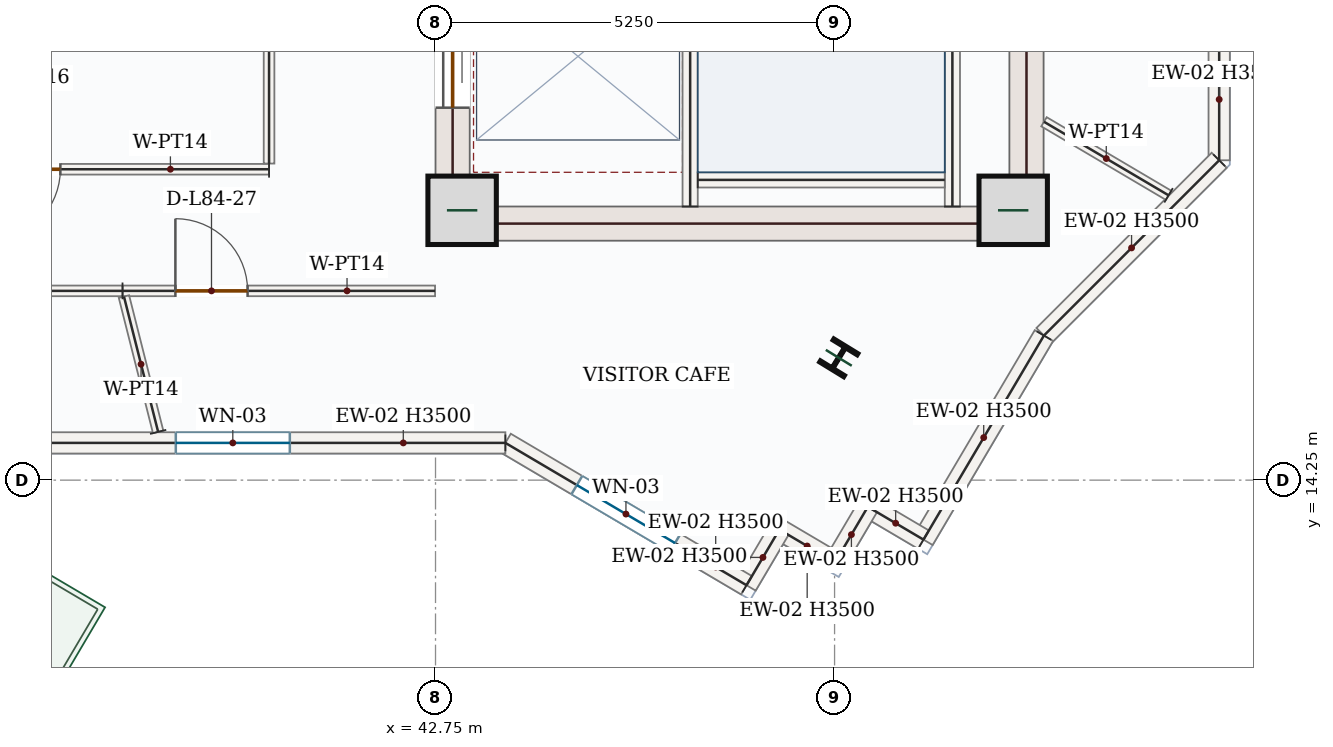
"""IFC4 building model, lengths in metres.
Left out: names, types, materials, properties, quantities, classifications, styles, units other than length and angle.
Written with IfcOpenShell. Run it as: python <this file> out.ifc"""

import sys

from ifc_helpers import new_model, si_unit, direction, frame, frame_2d, origin, origin_2d, place, context, subcontext, project, spatial, rectangle, i_section, extrude, source, transform, mapped, element, fill, save


model = new_model("IFC4")
c1 = context("Model", 3, precision=1e-05, world=origin(), true_north=direction((0.0, 1.0)))
c2 = subcontext(c1, "Body", "Model", "MODEL_VIEW")
j1 = project(units=[si_unit("LENGTHUNIT", "METRE"), si_unit("PLANEANGLEUNIT", "RADIAN")], contexts=[c1])
p1 = place(None, origin())
s1 = spatial("IfcSite", under=j1, at=p1, CompositionType="ELEMENT")
p2 = place(p1, origin())
s2 = spatial("IfcBuilding", under=s1, at=p2, CompositionType="ELEMENT")
p3 = place(p2, frame((0.0, 0.0, 346.05)))
s3 = spatial("IfcBuildingStorey", under=s2, at=p3, CompositionType="ELEMENT", Elevation=346.05)
p4 = place(p3, frame((42.975, 17.4, 0.0), z_axis=(0.0, 0.0, 1.0), x_axis=(0.0, 1.0, 0.0)))
e1 = element("IfcWall", 1, at=p4, inside=s3, PredefinedType="SHEAR", context=c2, shape_type="SweptSolid", body=[
    extrude(rectangle(XDim=8.55, YDim=0.45, at=frame_2d((4.275, 0.0))), origin(), (0.0, 0.0, 1.0), 3.5),
])
p5 = place(p4, frame((6.65, 0.0, 0.0)))
e2 = element("IfcOpeningElement", 2, at=p5, cuts=e1, PredefinedType="OPENING", context=c2, shape_type="SweptSolid", body=[
    extrude(rectangle(XDim=1.1, YDim=2.2, at=frame_2d((0.55, 1.1))), frame((0.0, 0.235, 0.0), z_axis=(0.0, -1.0, 0.0), x_axis=(1.0, 0.0, 0.0)), (0.0, 0.0, 1.0), 0.47),
])
p6 = place(p4, frame((1.75, 0.0, 0.0)))
e3 = element("IfcOpeningElement", 3, at=p6, cuts=e1, PredefinedType="OPENING", context=c2, shape_type="SweptSolid", body=[
    extrude(rectangle(XDim=1.3, YDim=2.2, at=frame_2d((0.65, 1.1))), frame((0.0, 0.235, 0.0), z_axis=(0.0, -1.0, 0.0), x_axis=(1.0, 0.0, 0.0)), (0.0, 0.0, 1.0), 0.47),
])
p7 = place(p4, frame((4.3, 0.0, 0.0)))
e4 = element("IfcOpeningElement", 4, at=p7, cuts=e1, PredefinedType="OPENING", context=c2, shape_type="SweptSolid", body=[
    extrude(rectangle(XDim=0.88, YDim=2.1, at=frame_2d((0.44, 1.05))), frame((0.0, 0.235, 0.0), z_axis=(0.0, -1.0, 0.0), x_axis=(1.0, 0.0, 0.0)), (0.0, 0.0, 1.0), 0.47),
])
m1 = source(origin(), c2, "Body", "SweptSolid", [
    extrude(rectangle(XDim=8.55, YDim=0.45, at=frame_2d((4.275, 0.0))), origin(), (0.0, 0.0, 1.0), 3.5),
])
p8 = place(p3, frame((50.525, 17.4, 0.0), z_axis=(0.0, 0.0, 1.0), x_axis=(0.0, 1.0, 0.0)))
e5 = element("IfcWall", 5, at=p8, inside=s3, PredefinedType="SHEAR", context=c2, shape_type="MappedRepresentation", body=[
    mapped(m1, transform((0.0, 0.0, 0.0), x_axis=(1.0, 0.0, 0.0), y_axis=(0.0, 1.0, 0.0), z_axis=(0.0, 0.0, 1.0), scale=1.0)),
])
m2 = source(origin(), c2, "Body", "SweptSolid", [
    extrude(rectangle(XDim=7.1, YDim=0.45, at=frame_2d((3.55, 0.0))), origin(), (0.0, 0.0, 1.0), 3.5),
])
p9 = place(p3, frame((43.2, 17.625, 0.0), z_axis=(0.0, 0.0, 1.0), x_axis=(1.0, 0.0, 0.0)))
e6 = element("IfcWall", 6, at=p9, inside=s3, PredefinedType="SHEAR", context=c2, shape_type="MappedRepresentation", body=[
    mapped(m2, transform((0.0, 0.0, 0.0), x_axis=(1.0, 0.0, 0.0), y_axis=(0.0, 1.0, 0.0), z_axis=(0.0, 0.0, 1.0), scale=1.0)),
])
m3 = source(origin(), c2, "Body", "SweptSolid", [
    extrude(rectangle(XDim=0.9, YDim=0.9, at=origin_2d()), origin(), (0.0, 0.0, 1.0), 3.75),
])
for number, where, z_axis, x_axis in (
    (7, (43.1, 17.8, 0.0), (0.0, 0.0, 1.0), (1.0, 0.0, 0.0)),
    (8, (50.35, 17.8, 0.0), (0.0, 0.0, 1.0), (1.0, 0.0, 0.0)),
):
    element("IfcColumn", number, at=place(p3, frame(where, z_axis=z_axis, x_axis=x_axis)), inside=s3, PredefinedType="COLUMN", context=c2, shape_type="MappedRepresentation", body=[
        mapped(m3, transform((0.0, 0.0, 0.0), x_axis=(1.0, 0.0, 0.0), y_axis=(0.0, 1.0, 0.0), z_axis=(0.0, 0.0, 1.0), scale=1.0)),
    ])
m4 = source(origin(), c2, "Body", "SweptSolid", [
    extrude(i_section(OverallWidth=0.369, OverallDepth=0.356, WebThickness=0.011, FlangeThickness=0.018, FilletRadius=0.018, at=origin_2d()), origin(), (0.0, 0.0, 1.0), 3.75),
])
p10 = place(p3, frame((48.055, 15.859, 0.0), z_axis=(0.0, 0.0, 1.0), x_axis=(-0.852640164354, 0.522498564716, 0.0)))
e9 = element("IfcColumn", 9, at=p10, inside=s3, PredefinedType="COLUMN", context=c2, shape_type="MappedRepresentation", body=[
    mapped(m4, transform((0.0, 0.0, 0.0), x_axis=(1.0, 0.0, 0.0), y_axis=(0.0, 1.0, 0.0), z_axis=(0.0, 0.0, 1.0), scale=1.0)),
])
m5 = source(origin(), c2, "Body", "SweptSolid", [
    extrude(rectangle(XDim=1.601, YDim=0.28, at=frame_2d((0.8, 0.0))), origin(), (0.0, 0.0, 1.0), 3.5),
])
p11 = place(p3, frame((53.06, 20.059, 0.0), z_axis=(0.0, 0.0, 1.0), x_axis=(0.0, -1.0, 0.0)))
e10 = element("IfcWall", 10, at=p11, inside=s3, PredefinedType="SOLIDWALL", context=c2, shape_type="MappedRepresentation", body=[
    mapped(m5, transform((0.0, 0.0, 0.0), x_axis=(1.0, 0.0, 0.0), y_axis=(0.0, 1.0, 0.0), z_axis=(0.0, 0.0, 1.0), scale=1.0)),
])
m6 = source(origin(), c2, "Body", "SweptSolid", [
    extrude(rectangle(XDim=3.261, YDim=0.28, at=frame_2d((1.63, 0.0))), origin(), (0.0, 0.0, 1.0), 3.5),
])
p12 = place(p3, frame((53.06, 18.458, 0.0), z_axis=(0.0, 0.0, 1.0), x_axis=(-0.707106781187, -0.707106781187, 0.0)))
e11 = element("IfcWall", 11, at=p12, inside=s3, PredefinedType="SOLIDWALL", context=c2, shape_type="MappedRepresentation", body=[
    mapped(m6, transform((0.0, 0.0, 0.0), x_axis=(1.0, 0.0, 0.0), y_axis=(0.0, 1.0, 0.0), z_axis=(0.0, 0.0, 1.0), scale=1.0)),
])
m7 = source(origin(), c2, "Body", "SweptSolid", [
    extrude(rectangle(XDim=3.118, YDim=0.28, at=frame_2d((1.559, 0.0))), origin(), (0.0, 0.0, 1.0), 3.5),
])
p13 = place(p3, frame((50.754, 16.152, 0.0), z_axis=(0.0, 0.0, 1.0), x_axis=(-0.508275482209, -0.861194539106, 0.0)))
e12 = element("IfcWall", 12, at=p13, inside=s3, PredefinedType="SOLIDWALL", context=c2, shape_type="MappedRepresentation", body=[
    mapped(m7, transform((0.0, 0.0, 0.0), x_axis=(1.0, 0.0, 0.0), y_axis=(0.0, 1.0, 0.0), z_axis=(0.0, 0.0, 1.0), scale=1.0)),
])
m8 = source(origin(), c2, "Body", "SweptSolid", [
    extrude(rectangle(XDim=0.85, YDim=0.28, at=frame_2d((0.425, 0.0))), origin(), (0.0, 0.0, 1.0), 3.5),
])
for number, where, z_axis, x_axis in (
    (13, (49.17, 13.467, 0.0), (0.0, 0.0, 1.0), (-0.861, 0.508, 0.0)),
    (14, (48.438, 13.899, 0.0), (0.0, 0.0, 1.0), (-0.508, -0.861, 0.0)),
    (15, (48.006, 13.167, 0.0), (0.0, 0.0, 1.0), (-0.861, 0.508, 0.0)),
    (16, (47.274, 13.6, 0.0), (0.0, 0.0, 1.0), (-0.508, -0.861, 0.0)),
):
    element("IfcWall", number, at=place(p3, frame(where, z_axis=z_axis, x_axis=x_axis)), inside=s3, PredefinedType="SOLIDWALL", context=c2, shape_type="MappedRepresentation", body=[
        mapped(m8, transform((0.0, 0.0, 0.0), x_axis=(1.0, 0.0, 0.0), y_axis=(0.0, 1.0, 0.0), z_axis=(0.0, 0.0, 1.0), scale=1.0)),
    ])
p14 = place(p3, frame((46.842, 12.867, 0.0), z_axis=(0.0, 0.0, 1.0), x_axis=(-0.861166561994, 0.508322882137, 0.0)))
e17 = element("IfcWall", 17, at=p14, inside=s3, PredefinedType="SOLIDWALL", context=c2, shape_type="SweptSolid", body=[
    extrude(rectangle(XDim=3.684, YDim=0.28, at=frame_2d((1.842, 0.0))), origin(), (0.0, 0.0, 1.0), 3.5),
])
p15 = place(p14, frame((1.092, 0.0, 0.85)))
e18 = element("IfcOpeningElement", 18, at=p15, cuts=e17, PredefinedType="OPENING", context=c2, shape_type="SweptSolid", body=[
    extrude(rectangle(XDim=1.5, YDim=1.5, at=frame_2d((0.75, 0.75))), frame((0.0, 0.15, 0.0), z_axis=(0.0, -1.0, 0.0), x_axis=(1.0, 0.0, 0.0)), (0.0, 0.0, 1.0), 0.3),
])
p16 = place(p3, frame((43.669, 14.74, 0.0), z_axis=(0.0, 0.0, 1.0), x_axis=(-1.0, 0.0, 0.0)))
e19 = element("IfcWall", 19, at=p16, inside=s3, PredefinedType="SOLIDWALL", context=c2, shape_type="SweptSolid", body=[
    extrude(rectangle(XDim=7.172, YDim=0.28, at=frame_2d((3.586, 0.0))), origin(), (0.0, 0.0, 1.0), 3.5),
])
p17 = place(p16, frame((2.836, 0.0, 0.85)))
e20 = element("IfcOpeningElement", 20, at=p17, cuts=e19, PredefinedType="OPENING", context=c2, shape_type="SweptSolid", body=[
    extrude(rectangle(XDim=1.5, YDim=1.5, at=frame_2d((0.75, 0.75))), frame((0.0, 0.15, 0.0), z_axis=(0.0, -1.0, 0.0), x_axis=(1.0, 0.0, 0.0)), (0.0, 0.0, 1.0), 0.3),
])
m9 = source(origin(), c2, "Body", "SweptSolid", [
    extrude(rectangle(XDim=7.87, YDim=0.2, at=frame_2d((3.935, 0.0))), origin(), (0.0, 0.0, 1.0), 3.5),
])
p18 = place(p3, frame((49.55, 17.85, 0.0), z_axis=(0.0, 0.0, 1.0), x_axis=(0.0, 1.0, 0.0)))
e21 = element("IfcWall", 21, at=p18, inside=s3, PredefinedType="SOLIDWALL", context=c2, shape_type="MappedRepresentation", body=[
    mapped(m9, transform((0.0, 0.0, 0.0), x_axis=(1.0, 0.0, 0.0), y_axis=(0.0, 1.0, 0.0), z_axis=(0.0, 0.0, 1.0), scale=1.0)),
])
p19 = place(p3, frame((46.1, 17.85, 0.0), z_axis=(0.0, 0.0, 1.0), x_axis=(0.0, 1.0, 0.0)))
e22 = element("IfcWall", 22, at=p19, inside=s3, PredefinedType="SOLIDWALL", context=c2, shape_type="SweptSolid", body=[
    extrude(rectangle(XDim=8.0, YDim=0.2, at=frame_2d((4.0, 0.0))), origin(), (0.0, 0.0, 1.0), 3.5),
])
p20 = place(p19, frame((6.3, 0.0, 0.0)))
e23 = element("IfcOpeningElement", 23, at=p20, cuts=e22, PredefinedType="OPENING", context=c2, shape_type="SweptSolid", body=[
    extrude(rectangle(XDim=1.05, YDim=2.15, at=frame_2d((0.525, 1.075))), frame((0.0, 0.11, 0.0), z_axis=(0.0, -1.0, 0.0), x_axis=(1.0, 0.0, 0.0)), (0.0, 0.0, 1.0), 0.22),
])
m10 = source(origin(), c2, "Body", "SweptSolid", [
    extrude(rectangle(XDim=3.25, YDim=0.2, at=frame_2d((1.625, 0.0))), origin(), (0.0, 0.0, 1.0), 3.5),
])
p21 = place(p3, frame((46.2, 18.2, 0.0), z_axis=(0.0, 0.0, 1.0), x_axis=(1.0, 0.0, 0.0)))
e24 = element("IfcWall", 24, at=p21, inside=s3, PredefinedType="SOLIDWALL", context=c2, shape_type="MappedRepresentation", body=[
    mapped(m10, transform((0.0, 0.0, 0.0), x_axis=(1.0, 0.0, 0.0), y_axis=(0.0, 1.0, 0.0), z_axis=(0.0, 0.0, 1.0), scale=1.0)),
])
p22 = place(p3, frame((40.56, 18.34, 0.0), z_axis=(0.0, 0.0, 1.0), x_axis=(-1.0, 0.0, 0.0)))
e25 = element("IfcWall", 25, at=p22, inside=s3, PredefinedType="PARTITIONING", context=c2, shape_type="SweptSolid", body=[
    extrude(rectangle(XDim=4.47, YDim=0.14, at=frame_2d((2.235, 0.0))), origin(), (0.0, 0.0, 1.0), 3.5),
])
p23 = place(p22, frame((2.746, 0.0, 0.0)))
e26 = element("IfcOpeningElement", 26, at=p23, cuts=e25, PredefinedType="OPENING", context=c2, shape_type="SweptSolid", body=[
    extrude(rectangle(XDim=0.95, YDim=2.15, at=frame_2d((0.475, 1.075))), frame((0.0, 0.08, 0.0), z_axis=(0.0, -1.0, 0.0), x_axis=(1.0, 0.0, 0.0)), (0.0, 0.0, 1.0), 0.16),
])
m11 = source(origin(), c2, "Body", "SweptSolid", [
    extrude(rectangle(XDim=3.52, YDim=0.14, at=frame_2d((1.76, 0.0))), origin(), (0.0, 0.0, 1.0), 3.5),
])
p24 = place(p3, frame((40.56, 21.935, 0.0), z_axis=(0.0, 0.0, 1.0), x_axis=(0.0, -1.0, 0.0)))
e27 = element("IfcWall", 27, at=p24, inside=s3, PredefinedType="PARTITIONING", context=c2, shape_type="MappedRepresentation", body=[
    mapped(m11, transform((0.0, 0.0, 0.0), x_axis=(1.0, 0.0, 0.0), y_axis=(0.0, 1.0, 0.0), z_axis=(0.0, 0.0, 1.0), scale=1.0)),
])
m12 = source(origin(), c2, "Body", "SweptSolid", [
    extrude(rectangle(XDim=1.904, YDim=0.14, at=frame_2d((0.952, 0.0))), origin(), (0.0, 0.0, 1.0), 3.5),
])
p25 = place(p3, frame((52.394, 17.997, 0.0), z_axis=(0.0, 0.0, 1.0), x_axis=(-0.86120470185, 0.508258262611, 0.0)))
e28 = element("IfcWall", 28, at=p25, inside=s3, PredefinedType="PARTITIONING", context=c2, shape_type="MappedRepresentation", body=[
    mapped(m12, transform((0.0, 0.0, 0.0), x_axis=(1.0, 0.0, 0.0), y_axis=(0.0, 1.0, 0.0), z_axis=(0.0, 0.0, 1.0), scale=1.0)),
])
p26 = place(p3, frame((38.632, 16.74, 0.0), z_axis=(0.0, 0.0, 1.0), x_axis=(1.0, 0.0, 0.0)))
e29 = element("IfcWall", 29, at=p26, inside=s3, PredefinedType="PARTITIONING", context=c2, shape_type="SweptSolid", body=[
    extrude(rectangle(XDim=4.112, YDim=0.14, at=frame_2d((2.056, 0.0))), origin(), (0.0, 0.0, 1.0), 3.5),
])
p27 = place(p26, frame((0.696, 0.0, 0.0)))
e30 = element("IfcOpeningElement", 30, at=p27, cuts=e29, PredefinedType="OPENING", context=c2, shape_type="SweptSolid", body=[
    extrude(rectangle(XDim=0.95, YDim=2.15, at=frame_2d((0.475, 1.075))), frame((0.0, 0.08, 0.0), z_axis=(0.0, -1.0, 0.0), x_axis=(1.0, 0.0, 0.0)), (0.0, 0.0, 1.0), 0.16),
])
m13 = source(origin(), c2, "Body", "SweptSolid", [
    extrude(rectangle(XDim=1.836, YDim=0.14, at=frame_2d((0.918, 0.0))), origin(), (0.0, 0.0, 1.0), 3.5),
])
p28 = place(p3, frame((39.101, 14.885, 0.0), z_axis=(0.0, 0.0, 1.0), x_axis=(-0.24494411221, 0.96953719985, 0.0)))
e31 = element("IfcWall", 31, at=p28, inside=s3, PredefinedType="PARTITIONING", context=c2, shape_type="MappedRepresentation", body=[
    mapped(m13, transform((0.0, 0.0, 0.0), x_axis=(1.0, 0.0, 0.0), y_axis=(0.0, 1.0, 0.0), z_axis=(0.0, 0.0, 1.0), scale=1.0)),
])
p29 = place(p3, frame((30.618, 16.74, 0.0), z_axis=(0.0, 0.0, 1.0), x_axis=(1.0, 0.0, 0.0)))
e32 = element("IfcWall", 32, at=p29, inside=s3, PredefinedType="PARTITIONING", context=c2, shape_type="SweptSolid", body=[
    extrude(rectangle(XDim=8.014, YDim=0.14, at=frame_2d((4.007, 0.0))), origin(), (0.0, 0.0, 1.0), 3.5),
])
p30 = place(p29, frame((4.592, 0.0, 0.0)))
e33 = element("IfcOpeningElement", 33, at=p30, cuts=e32, PredefinedType="OPENING", context=c2, shape_type="SweptSolid", body=[
    extrude(rectangle(XDim=0.95, YDim=2.15, at=frame_2d((0.475, 1.075))), frame((0.0, 0.08, 0.0), z_axis=(0.0, -1.0, 0.0), x_axis=(1.0, 0.0, 0.0)), (0.0, 0.0, 1.0), 0.16),
])
m14 = source(origin(), c2, "Body", "SweptSolid", [
    extrude(rectangle(XDim=1.5, YDim=1.5, at=frame_2d((0.75, 0.75))), frame((0.0, 0.03, 0.0), z_axis=(0.0, -1.0, 0.0), x_axis=(1.0, 0.0, 0.0)), (0.0, 0.0, 1.0), 0.06),
])
p31 = place(p15, origin())
e34 = element("IfcWindow", 34, at=p31, inside=s3, PartitioningType="SINGLE_PANEL", PredefinedType="WINDOW", context=c2, shape_type="MappedRepresentation", body=[
    mapped(m14, transform((0.0, 0.0, 0.0), x_axis=(1.0, 0.0, 0.0), y_axis=(0.0, 1.0, 0.0), z_axis=(0.0, 0.0, 1.0), scale=1.0)),
])
fill(e18, e34)
p32 = place(p17, origin())
e35 = element("IfcWindow", 35, at=p32, inside=s3, PartitioningType="SINGLE_PANEL", PredefinedType="WINDOW", context=c2, shape_type="MappedRepresentation", body=[
    mapped(m14, transform((0.0, 0.0, 0.0), x_axis=(1.0, 0.0, 0.0), y_axis=(0.0, 1.0, 0.0), z_axis=(0.0, 0.0, 1.0), scale=1.0)),
])
fill(e20, e35)
m15 = source(origin(), c2, "Body", "SweptSolid", [
    extrude(rectangle(XDim=1.3, YDim=2.2, at=frame_2d((0.65, 1.1))), frame((0.0, 0.025, 0.0), z_axis=(0.0, -1.0, 0.0), x_axis=(1.0, 0.0, 0.0)), (0.0, 0.0, 1.0), 0.05),
])
p33 = place(p6, origin())
e36 = element("IfcDoor", 36, at=p33, inside=s3, OperationType="DOUBLE_DOOR_SLIDING", PredefinedType="DOOR", context=c2, shape_type="MappedRepresentation", body=[
    mapped(m15, transform((0.0, 0.0, 0.0), x_axis=(1.0, 0.0, 0.0), y_axis=(0.0, 1.0, 0.0), z_axis=(0.0, 0.0, 1.0), scale=1.0)),
])
fill(e3, e36)
m16 = source(origin(), c2, "Body", "SweptSolid", [
    extrude(rectangle(XDim=0.95, YDim=2.15, at=frame_2d((0.475, 1.075))), frame((0.0, 0.025, 0.0), z_axis=(0.0, -1.0, 0.0), x_axis=(1.0, 0.0, 0.0)), (0.0, 0.0, 1.0), 0.05),
])
p34 = place(p23, origin())
e37 = element("IfcDoor", 37, at=p34, inside=s3, OperationType="SINGLE_SWING_RIGHT", PredefinedType="DOOR", context=c2, shape_type="MappedRepresentation", body=[
    mapped(m16, transform((0.0, 0.0, 0.0), x_axis=(1.0, 0.0, 0.0), y_axis=(0.0, 1.0, 0.0), z_axis=(0.0, 0.0, 1.0), scale=1.0)),
])
fill(e26, e37)
p35 = place(p27, origin())
e38 = element("IfcDoor", 38, at=p35, inside=s3, OperationType="SINGLE_SWING_LEFT", PredefinedType="DOOR", context=c2, shape_type="MappedRepresentation", body=[
    mapped(m16, transform((0.0, 0.0, 0.0), x_axis=(1.0, 0.0, 0.0), y_axis=(0.0, 1.0, 0.0), z_axis=(0.0, 0.0, 1.0), scale=1.0)),
])
fill(e30, e38)
save(model, sys.argv[1])
